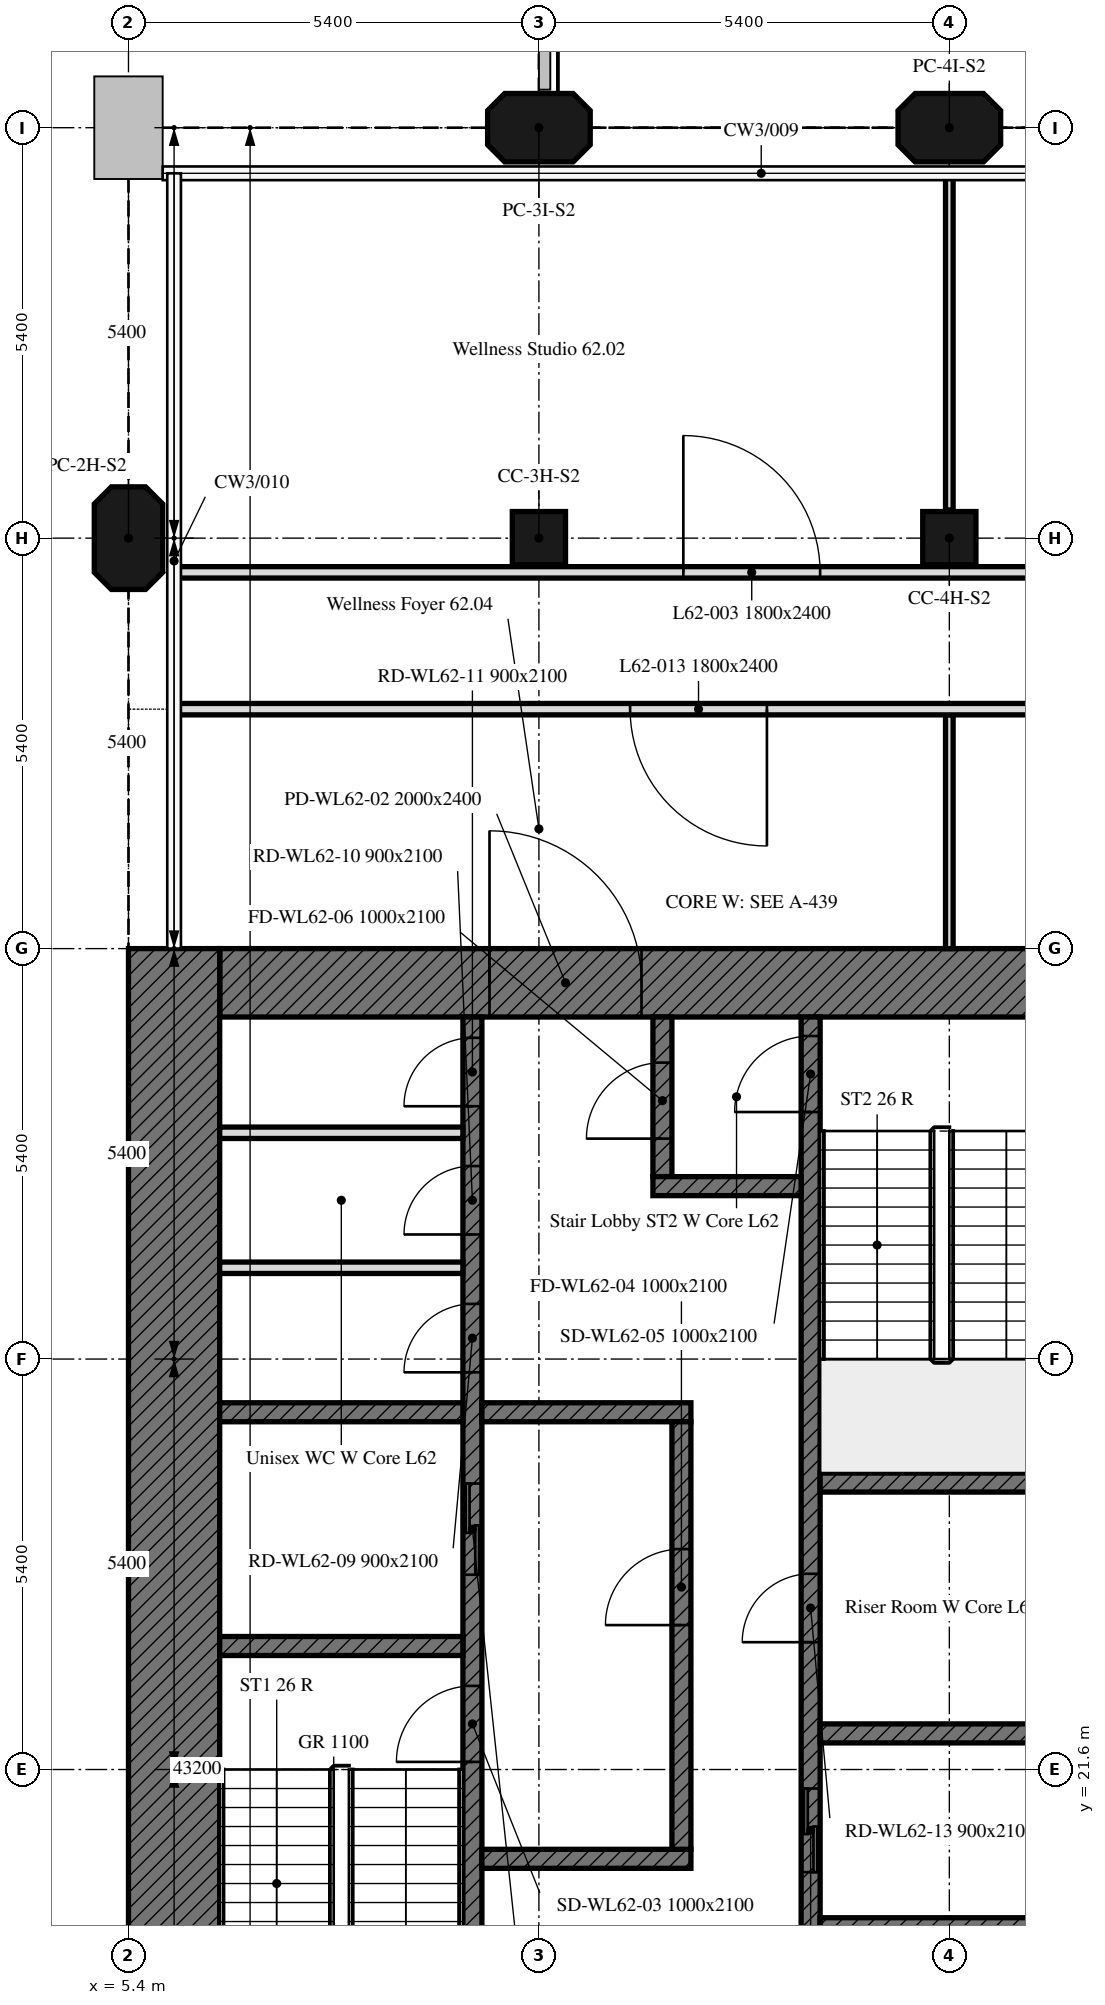
"""IFC4 building model, lengths in metres.
Left out: names, types, materials, properties, quantities, classifications, styles, units other than length and angle.
Written with IfcOpenShell. Run it as: python <this file> out.ifc"""

import sys

from ifc_helpers import new_model, si_unit, direction, frame, frame_2d, origin, origin_2d, place, context, subcontext, project, spatial, polyline, rectangle, outline, extrude, element, fill, save


model = new_model("IFC4")
c1 = context("Model", 3, precision=1e-05, world=origin(), true_north=direction((0.0, 1.0)))
c2 = subcontext(c1, "Body", "Model", "MODEL_VIEW")
j1 = project(units=[si_unit("LENGTHUNIT", "METRE"), si_unit("PLANEANGLEUNIT", "RADIAN")], contexts=[c1])
p1 = place(None, origin())
s1 = spatial("IfcSite", under=j1, at=p1, CompositionType="ELEMENT")
p2 = place(p1, origin())
s2 = spatial("IfcBuilding", under=s1, at=p2, CompositionType="ELEMENT")
p3 = place(p2, frame((0.0, 0.0, 255.7)))
s3 = spatial("IfcBuildingStorey", under=s2, at=p3, CompositionType="ELEMENT", Elevation=255.7)
p4 = place(p3, frame((5.4, 37.8, 0.0), z_axis=(0.0, 0.0, 1.0), x_axis=(0.0, 1.0, 0.0)))
e1 = element("IfcColumn", 1, at=p4, inside=s3, PredefinedType="COLUMN", context=c2, shape_type="SweptSolid", body=[
    extrude(outline(polyline([(-0.45, -0.45), (0.45, -0.45), (0.675, -0.225), (0.675, 0.225), (0.45, 0.45), (-0.45, 0.45), (-0.675, 0.225), (-0.675, -0.225), (-0.45, -0.45)])), origin(), (0.0, 0.0, 1.0), 4.5),
])
for number, where, z_axis, x_axis in (
    (2, (10.8, 37.8, 0.0), (0.0, 0.0, 1.0), (1.0, 0.0, 0.0)),
    (3, (16.2, 37.8, 0.0), (0.0, 0.0, 1.0), (1.0, 0.0, 0.0)),
):
    element("IfcColumn", number, at=place(p3, frame(where, z_axis=z_axis, x_axis=x_axis)), inside=s3, PredefinedType="COLUMN", context=c2, shape_type="SweptSolid", body=[
        extrude(rectangle(XDim=0.7, YDim=0.7, at=origin_2d()), origin(), (0.0, 0.0, 1.0), 4.5),
    ])
for number, where, z_axis, x_axis in (
    (4, (10.8, 43.2, 0.0), (0.0, 0.0, 1.0), (1.0, 0.0, 0.0)),
    (5, (16.2, 43.2, 0.0), (0.0, 0.0, 1.0), (1.0, 0.0, 0.0)),
):
    element("IfcColumn", number, at=place(p3, frame(where, z_axis=z_axis, x_axis=x_axis)), inside=s3, PredefinedType="COLUMN", context=c2, shape_type="SweptSolid", body=[
        extrude(outline(polyline([(-0.45, -0.45), (0.45, -0.45), (0.675, -0.225), (0.675, 0.225), (0.45, 0.45), (-0.45, 0.45), (-0.675, 0.225), (-0.675, -0.225), (-0.45, -0.45)])), origin(), (0.0, 0.0, 1.0), 4.5),
    ])
p5 = place(p3, frame((6.6, 31.95, 0.0), z_axis=(0.0, 0.0, 1.0), x_axis=(1.0, 0.0, 0.0)))
e6 = element("IfcWall", 6, at=p5, inside=s3, PredefinedType="SOLIDWALL", context=c2, shape_type="SweptSolid", body=[
    extrude(rectangle(XDim=11.1, YDim=0.9, at=frame_2d((5.55, 0.0))), origin(), (0.0, 0.0, 1.0), 4.5),
])
p6 = place(p5, frame((3.55, 0.0, 0.0)))
e7 = element("IfcOpeningElement", 7, at=p6, cuts=e6, PredefinedType="OPENING", context=c2, shape_type="SweptSolid", body=[
    extrude(rectangle(XDim=2.0, YDim=2.4, at=frame_2d((1.0, 1.2))), frame((0.0, 0.45, 0.0), z_axis=(0.0, -1.0, 0.0), x_axis=(1.0, 0.0, 0.0)), (0.0, 0.0, 1.0), 0.9),
])
p7 = place(p3, frame((6.0, 16.2, 0.0), z_axis=(0.0, 0.0, 1.0), x_axis=(0.0, 1.0, 0.0)))
e8 = element("IfcWall", 8, at=p7, inside=s3, PredefinedType="SOLIDWALL", context=c2, shape_type="SweptSolid", body=[
    extrude(rectangle(XDim=16.2, YDim=1.2, at=frame_2d((8.1, 0.0))), origin(), (0.0, 0.0, 1.0), 4.5),
])
p8 = place(p3, frame((9.925, 17.1, 0.0), z_axis=(0.0, 0.0, 1.0), x_axis=(0.0, 1.0, 0.0)))
e9 = element("IfcWall", 9, at=p8, inside=s3, PredefinedType="SOLIDWALL", context=c2, shape_type="SweptSolid", body=[
    extrude(rectangle(XDim=14.4, YDim=0.25, at=frame_2d((7.2, 0.0))), origin(), (0.0, 0.0, 1.0), 4.5),
])
p9 = place(p8, frame((4.6, 0.0, 0.0)))
e10 = element("IfcOpeningElement", 10, at=p9, cuts=e9, PredefinedType="OPENING", context=c2, shape_type="SweptSolid", body=[
    extrude(rectangle(XDim=1.0, YDim=2.1, at=frame_2d((0.5, 1.05))), frame((0.0, 0.125, 0.0), z_axis=(0.0, -1.0, 0.0), x_axis=(1.0, 0.0, 0.0)), (0.0, 0.0, 1.0), 0.25),
])
p10 = place(p8, frame((7.062, 0.0, 0.0)))
e11 = element("IfcOpeningElement", 11, at=p10, cuts=e9, PredefinedType="OPENING", context=c2, shape_type="SweptSolid", body=[
    extrude(rectangle(XDim=1.2, YDim=2.1, at=frame_2d((0.6, 1.05))), frame((0.0, 0.125, 0.0), z_axis=(0.0, -1.0, 0.0), x_axis=(1.0, 0.0, 0.0)), (0.0, 0.0, 1.0), 0.25),
])
p11 = place(p8, frame((9.726, 0.0, 0.0)))
e12 = element("IfcOpeningElement", 12, at=p11, cuts=e9, PredefinedType="OPENING", context=c2, shape_type="SweptSolid", body=[
    extrude(rectangle(XDim=0.9, YDim=2.1, at=frame_2d((0.45, 1.05))), frame((0.0, 0.125, 0.0), z_axis=(0.0, -1.0, 0.0), x_axis=(1.0, 0.0, 0.0)), (0.0, 0.0, 1.0), 0.25),
])
p12 = place(p8, frame((11.539, 0.0, 0.0)))
e13 = element("IfcOpeningElement", 13, at=p12, cuts=e9, PredefinedType="OPENING", context=c2, shape_type="SweptSolid", body=[
    extrude(rectangle(XDim=0.9, YDim=2.1, at=frame_2d((0.45, 1.05))), frame((0.0, 0.125, 0.0), z_axis=(0.0, -1.0, 0.0), x_axis=(1.0, 0.0, 0.0)), (0.0, 0.0, 1.0), 0.25),
])
p13 = place(p8, frame((13.226, 0.0, 0.0)))
e14 = element("IfcOpeningElement", 14, at=p13, cuts=e9, PredefinedType="OPENING", context=c2, shape_type="SweptSolid", body=[
    extrude(rectangle(XDim=0.9, YDim=2.1, at=frame_2d((0.45, 1.05))), frame((0.0, 0.125, 0.0), z_axis=(0.0, -1.0, 0.0), x_axis=(1.0, 0.0, 0.0)), (0.0, 0.0, 1.0), 0.25),
])
p14 = place(p3, frame((14.375, 17.1, 0.0), z_axis=(0.0, 0.0, 1.0), x_axis=(0.0, 1.0, 0.0)))
e15 = element("IfcWall", 15, at=p14, inside=s3, PredefinedType="SOLIDWALL", context=c2, shape_type="SweptSolid", body=[
    extrude(rectangle(XDim=14.4, YDim=0.25, at=frame_2d((7.2, 0.0))), origin(), (0.0, 0.0, 1.0), 4.5),
])
p15 = place(p14, frame((13.15, 0.0, 0.0)))
e16 = element("IfcOpeningElement", 16, at=p15, cuts=e15, PredefinedType="OPENING", context=c2, shape_type="SweptSolid", body=[
    extrude(rectangle(XDim=1.0, YDim=2.1, at=frame_2d((0.5, 1.05))), frame((0.0, 0.125, 0.0), z_axis=(0.0, -1.0, 0.0), x_axis=(1.0, 0.0, 0.0)), (0.0, 0.0, 1.0), 0.25),
])
p16 = place(p14, frame((3.15, 0.0, 0.0)))
e17 = element("IfcOpeningElement", 17, at=p16, cuts=e15, PredefinedType="OPENING", context=c2, shape_type="SweptSolid", body=[
    extrude(rectangle(XDim=1.1, YDim=2.1, at=frame_2d((0.55, 1.05))), frame((0.0, 0.125, 0.0), z_axis=(0.0, -1.0, 0.0), x_axis=(1.0, 0.0, 0.0)), (0.0, 0.0, 1.0), 0.25),
])
p17 = place(p14, frame((0.7, 0.0, 0.0)))
e18 = element("IfcOpeningElement", 18, at=p17, cuts=e15, PredefinedType="OPENING", context=c2, shape_type="SweptSolid", body=[
    extrude(rectangle(XDim=0.9, YDim=2.1, at=frame_2d((0.45, 1.05))), frame((0.0, 0.125, 0.0), z_axis=(0.0, -1.0, 0.0), x_axis=(1.0, 0.0, 0.0)), (0.0, 0.0, 1.0), 0.25),
])
p18 = place(p14, frame((6.175, 0.0, 0.0)))
e19 = element("IfcOpeningElement", 19, at=p18, cuts=e15, PredefinedType="OPENING", context=c2, shape_type="SweptSolid", body=[
    extrude(rectangle(XDim=0.9, YDim=2.1, at=frame_2d((0.45, 1.05))), frame((0.0, 0.125, 0.0), z_axis=(0.0, -1.0, 0.0), x_axis=(1.0, 0.0, 0.0)), (0.0, 0.0, 1.0), 0.25),
])
for number, where, z_axis, x_axis in (
    (20, (6.6, 23.225, 0.0), (0.0, 0.0, 1.0), (1.0, 0.0, 0.0)),
    (21, (14.5, 25.375, 0.0), (0.0, 0.0, 1.0), (1.0, 0.0, 0.0)),
    (22, (14.5, 22.075, 0.0), (0.0, 0.0, 1.0), (1.0, 0.0, 0.0)),
    (23, (6.6, 26.3, 0.0), (0.0, 0.0, 1.0), (1.0, 0.0, 0.0)),
):
    element("IfcWall", number, at=place(p3, frame(where, z_axis=z_axis, x_axis=x_axis)), inside=s3, PredefinedType="SOLIDWALL", context=c2, shape_type="SweptSolid", body=[
        extrude(rectangle(XDim=3.2, YDim=0.25, at=frame_2d((1.6, 0.0))), origin(), (0.0, 0.0, 1.0), 4.5),
    ])
for number, where, z_axis, x_axis in (
    (24, (10.05, 26.3, 0.0), (0.0, 0.0, 1.0), (1.0, 0.0, 0.0)),
    (25, (10.05, 20.425, 0.0), (0.0, 0.0, 1.0), (1.0, 0.0, 0.0)),
):
    element("IfcWall", number, at=place(p3, frame(where, z_axis=z_axis, x_axis=x_axis)), inside=s3, PredefinedType="SOLIDWALL", context=c2, shape_type="SweptSolid", body=[
        extrude(rectangle(XDim=2.75, YDim=0.25, at=frame_2d((1.375, 0.0))), origin(), (0.0, 0.0, 1.0), 4.5),
    ])
p19 = place(p3, frame((12.425, 29.4, 0.0), z_axis=(0.0, 0.0, 1.0), x_axis=(0.0, 1.0, 0.0)))
e26 = element("IfcWall", 26, at=p19, inside=s3, PredefinedType="SOLIDWALL", context=c2, shape_type="SweptSolid", body=[
    extrude(rectangle(XDim=2.1, YDim=0.25, at=frame_2d((1.05, 0.0))), origin(), (0.0, 0.0, 1.0), 4.5),
])
p20 = place(p19, frame((0.5, 0.0, 0.0)))
e27 = element("IfcOpeningElement", 27, at=p20, cuts=e26, PredefinedType="OPENING", context=c2, shape_type="SweptSolid", body=[
    extrude(rectangle(XDim=1.0, YDim=2.1, at=frame_2d((0.5, 1.05))), frame((0.0, 0.125, 0.0), z_axis=(0.0, -1.0, 0.0), x_axis=(1.0, 0.0, 0.0)), (0.0, 0.0, 1.0), 0.25),
])
p21 = place(p3, frame((12.3, 29.275, 0.0), z_axis=(0.0, 0.0, 1.0), x_axis=(1.0, 0.0, 0.0)))
e28 = element("IfcWall", 28, at=p21, inside=s3, PredefinedType="SOLIDWALL", context=c2, shape_type="SweptSolid", body=[
    extrude(rectangle(XDim=1.95, YDim=0.25, at=frame_2d((0.975, 0.0))), origin(), (0.0, 0.0, 1.0), 4.5),
])
p22 = place(p3, frame((12.675, 20.55, 0.0), z_axis=(0.0, 0.0, 1.0), x_axis=(0.0, 1.0, 0.0)))
e29 = element("IfcWall", 29, at=p22, inside=s3, PredefinedType="SOLIDWALL", context=c2, shape_type="SweptSolid", body=[
    extrude(rectangle(XDim=5.625, YDim=0.25, at=frame_2d((2.812, 0.0))), origin(), (0.0, 0.0, 1.0), 4.5),
])
p23 = place(p22, frame((2.95, 0.0, 0.0)))
e30 = element("IfcOpeningElement", 30, at=p23, cuts=e29, PredefinedType="OPENING", context=c2, shape_type="SweptSolid", body=[
    extrude(rectangle(XDim=1.0, YDim=2.1, at=frame_2d((0.5, 1.05))), frame((0.0, 0.125, 0.0), z_axis=(0.0, -1.0, 0.0), x_axis=(1.0, 0.0, 0.0)), (0.0, 0.0, 1.0), 0.25),
])
p24 = place(p3, frame((14.5, 19.525, 0.0), z_axis=(0.0, 0.0, 1.0), x_axis=(1.0, 0.0, 0.0)))
e31 = element("IfcWall", 31, at=p24, inside=s3, PredefinedType="SOLIDWALL", context=c2, shape_type="SweptSolid", body=[
    extrude(rectangle(XDim=3.2, YDim=0.25, at=frame_2d((1.6, 0.0))), origin(), (0.0, 0.0, 1.0), 4.5),
])
for number, where, z_axis, x_axis in (
    (32, (6.6, 28.201, 0.0), (0.0, 0.0, 1.0), (1.0, 0.0, 0.0)),
    (33, (6.6, 29.977, 0.0), (0.0, 0.0, 1.0), (1.0, 0.0, 0.0)),
):
    element("IfcWall", number, at=place(p3, frame(where, z_axis=z_axis, x_axis=x_axis)), inside=s3, PredefinedType="PARTITIONING", context=c2, shape_type="SweptSolid", body=[
        extrude(rectangle(XDim=3.2, YDim=0.15, at=frame_2d((1.6, 0.0))), origin(), (0.0, 0.0, 1.0), 4.5),
    ])
p25 = place(p3, frame((16.2, 42.6, 0.0), z_axis=(0.0, 0.0, 1.0), x_axis=(0.0, -1.0, 0.0)))
e34 = element("IfcWall", 34, at=p25, inside=s3, PredefinedType="PARTITIONING", context=c2, shape_type="SweptSolid", body=[
    extrude(rectangle(XDim=4.43, YDim=0.1, at=frame_2d((2.215, 0.0))), origin(), (0.0, 0.0, 1.0), 4.5),
])
p26 = place(p3, frame((6.0, 37.35, 0.0), z_axis=(0.0, 0.0, 1.0), x_axis=(1.0, 0.0, 0.0)))
e35 = element("IfcWall", 35, at=p26, inside=s3, PredefinedType="PARTITIONING", context=c2, shape_type="SweptSolid", body=[
    extrude(rectangle(XDim=31.349, YDim=0.15, at=frame_2d((15.675, 0.0))), origin(), (0.0, 0.0, 1.0), 4.5),
])
p27 = place(p26, frame((28.2, 0.0, 0.0)))
e36 = element("IfcOpeningElement", 36, at=p27, cuts=e35, PredefinedType="OPENING", context=c2, shape_type="SweptSolid", body=[
    extrude(rectangle(XDim=1.8, YDim=2.4, at=frame_2d((0.9, 1.2))), frame((0.0, 0.075, 0.0), z_axis=(0.0, -1.0, 0.0), x_axis=(1.0, 0.0, 0.0)), (0.0, 0.0, 1.0), 0.15),
])
p28 = place(p26, frame((17.5, 0.0, 0.0)))
e37 = element("IfcOpeningElement", 37, at=p28, cuts=e35, PredefinedType="OPENING", context=c2, shape_type="SweptSolid", body=[
    extrude(rectangle(XDim=1.8, YDim=2.4, at=frame_2d((0.9, 1.2))), frame((0.0, 0.075, 0.0), z_axis=(0.0, -1.0, 0.0), x_axis=(1.0, 0.0, 0.0)), (0.0, 0.0, 1.0), 0.15),
])
p29 = place(p26, frame((6.7, 0.0, 0.0)))
e38 = element("IfcOpeningElement", 38, at=p29, cuts=e35, PredefinedType="OPENING", context=c2, shape_type="SweptSolid", body=[
    extrude(rectangle(XDim=1.8, YDim=2.4, at=frame_2d((0.9, 1.2))), frame((0.0, 0.075, 0.0), z_axis=(0.0, -1.0, 0.0), x_axis=(1.0, 0.0, 0.0)), (0.0, 0.0, 1.0), 0.15),
])
p30 = place(p3, frame((16.2, 35.475, 0.0), z_axis=(0.0, 0.0, 1.0), x_axis=(0.0, -1.0, 0.0)))
e39 = element("IfcWall", 39, at=p30, inside=s3, PredefinedType="PARTITIONING", context=c2, shape_type="SweptSolid", body=[
    extrude(rectangle(XDim=3.075, YDim=0.1, at=frame_2d((1.538, 0.0))), origin(), (0.0, 0.0, 1.0), 4.5),
])
p31 = place(p3, frame((42.6, 35.55, 0.0), z_axis=(0.0, 0.0, 1.0), x_axis=(-1.0, 0.0, 0.0)))
e40 = element("IfcWall", 40, at=p31, inside=s3, PredefinedType="PARTITIONING", context=c2, shape_type="SweptSolid", body=[
    extrude(rectangle(XDim=36.6, YDim=0.15, at=frame_2d((18.3, 0.0))), origin(), (0.0, 0.0, 1.0), 4.5),
])
p32 = place(p31, frame((12.0, 0.0, 0.0)))
e41 = element("IfcOpeningElement", 41, at=p32, cuts=e40, PredefinedType="OPENING", context=c2, shape_type="SweptSolid", body=[
    extrude(rectangle(XDim=1.8, YDim=2.4, at=frame_2d((0.9, 1.2))), frame((0.0, 0.075, 0.0), z_axis=(0.0, -1.0, 0.0), x_axis=(1.0, 0.0, 0.0)), (0.0, 0.0, 1.0), 0.15),
])
p33 = place(p31, frame((17.4, 0.0, 0.0)))
e42 = element("IfcOpeningElement", 42, at=p33, cuts=e40, PredefinedType="OPENING", context=c2, shape_type="SweptSolid", body=[
    extrude(rectangle(XDim=1.8, YDim=2.4, at=frame_2d((0.9, 1.2))), frame((0.0, 0.075, 0.0), z_axis=(0.0, -1.0, 0.0), x_axis=(1.0, 0.0, 0.0)), (0.0, 0.0, 1.0), 0.15),
])
p34 = place(p31, frame((22.8, 0.0, 0.0)))
e43 = element("IfcOpeningElement", 43, at=p34, cuts=e40, PredefinedType="OPENING", context=c2, shape_type="SweptSolid", body=[
    extrude(rectangle(XDim=1.8, YDim=2.4, at=frame_2d((0.9, 1.2))), frame((0.0, 0.075, 0.0), z_axis=(0.0, -1.0, 0.0), x_axis=(1.0, 0.0, 0.0)), (0.0, 0.0, 1.0), 0.15),
])
p35 = place(p31, frame((1.8, 0.0, 0.0)))
e44 = element("IfcOpeningElement", 44, at=p35, cuts=e40, PredefinedType="OPENING", context=c2, shape_type="SweptSolid", body=[
    extrude(rectangle(XDim=1.8, YDim=2.4, at=frame_2d((0.9, 1.2))), frame((0.0, 0.075, 0.0), z_axis=(0.0, -1.0, 0.0), x_axis=(1.0, 0.0, 0.0)), (0.0, 0.0, 1.0), 0.15),
])
p36 = place(p31, frame((28.8, 0.0, 0.0)))
e45 = element("IfcOpeningElement", 45, at=p36, cuts=e40, PredefinedType="OPENING", context=c2, shape_type="SweptSolid", body=[
    extrude(rectangle(XDim=1.8, YDim=2.4, at=frame_2d((0.9, 1.2))), frame((0.0, 0.075, 0.0), z_axis=(0.0, -1.0, 0.0), x_axis=(1.0, 0.0, 0.0)), (0.0, 0.0, 1.0), 0.15),
])
p37 = place(p6, origin())
e46 = element("IfcDoor", 46, at=p37, inside=s3, OperationType="DOUBLE_DOOR_SINGLE_SWING", PredefinedType="DOOR", context=c2, shape_type="SweptSolid", body=[
    extrude(rectangle(XDim=2.0, YDim=2.4, at=frame_2d((1.0, 1.2))), frame((0.0, 0.025, 0.0), z_axis=(0.0, -1.0, 0.0), x_axis=(1.0, 0.0, 0.0)), (0.0, 0.0, 1.0), 0.05),
])
fill(e7, e46)
p38 = place(p9, origin())
e47 = element("IfcDoor", 47, at=p38, inside=s3, OperationType="SINGLE_SWING_LEFT", PredefinedType="DOOR", context=c2, shape_type="SweptSolid", body=[
    extrude(rectangle(XDim=1.0, YDim=2.1, at=frame_2d((0.5, 1.05))), frame((0.0, 0.025, 0.0), z_axis=(0.0, -1.0, 0.0), x_axis=(1.0, 0.0, 0.0)), (0.0, 0.0, 1.0), 0.05),
])
fill(e10, e47)
p39 = place(p23, origin())
e48 = element("IfcDoor", 48, at=p39, inside=s3, OperationType="SINGLE_SWING_LEFT", PredefinedType="DOOR", context=c2, shape_type="SweptSolid", body=[
    extrude(rectangle(XDim=1.0, YDim=2.1, at=frame_2d((0.5, 1.05))), frame((0.0, 0.025, 0.0), z_axis=(0.0, -1.0, 0.0), x_axis=(1.0, 0.0, 0.0)), (0.0, 0.0, 1.0), 0.05),
])
fill(e30, e48)
p40 = place(p15, origin())
e49 = element("IfcDoor", 49, at=p40, inside=s3, OperationType="SINGLE_SWING_LEFT", PredefinedType="DOOR", context=c2, shape_type="SweptSolid", body=[
    extrude(rectangle(XDim=1.0, YDim=2.1, at=frame_2d((0.5, 1.05))), frame((0.0, 0.025, 0.0), z_axis=(0.0, -1.0, 0.0), x_axis=(1.0, 0.0, 0.0)), (0.0, 0.0, 1.0), 0.05),
])
fill(e16, e49)
p41 = place(p20, origin())
e50 = element("IfcDoor", 50, at=p41, inside=s3, OperationType="SINGLE_SWING_LEFT", PredefinedType="DOOR", context=c2, shape_type="SweptSolid", body=[
    extrude(rectangle(XDim=1.0, YDim=2.1, at=frame_2d((0.5, 1.05))), frame((0.0, 0.025, 0.0), z_axis=(0.0, -1.0, 0.0), x_axis=(1.0, 0.0, 0.0)), (0.0, 0.0, 1.0), 0.05),
])
fill(e27, e50)
p42 = place(p10, origin())
e51 = element("IfcDoor", 51, at=p42, inside=s3, OperationType="DOUBLE_DOOR_SLIDING", PredefinedType="DOOR", context=c2, shape_type="SweptSolid", body=[
    extrude(rectangle(XDim=1.2, YDim=2.1, at=frame_2d((0.6, 1.05))), frame((0.0, 0.025, 0.0), z_axis=(0.0, -1.0, 0.0), x_axis=(1.0, 0.0, 0.0)), (0.0, 0.0, 1.0), 0.05),
])
fill(e11, e51)
p43 = place(p16, origin())
e52 = element("IfcDoor", 52, at=p43, inside=s3, OperationType="DOUBLE_DOOR_SLIDING", PredefinedType="DOOR", context=c2, shape_type="SweptSolid", body=[
    extrude(rectangle(XDim=1.1, YDim=2.1, at=frame_2d((0.55, 1.05))), frame((0.0, 0.025, 0.0), z_axis=(0.0, -1.0, 0.0), x_axis=(1.0, 0.0, 0.0)), (0.0, 0.0, 1.0), 0.05),
])
fill(e17, e52)
p44 = place(p11, origin())
e53 = element("IfcDoor", 53, at=p44, inside=s3, OperationType="SINGLE_SWING_LEFT", PredefinedType="DOOR", context=c2, shape_type="SweptSolid", body=[
    extrude(rectangle(XDim=0.9, YDim=2.1, at=frame_2d((0.45, 1.05))), frame((0.0, 0.025, 0.0), z_axis=(0.0, -1.0, 0.0), x_axis=(1.0, 0.0, 0.0)), (0.0, 0.0, 1.0), 0.05),
])
fill(e12, e53)
p45 = place(p12, origin())
e54 = element("IfcDoor", 54, at=p45, inside=s3, OperationType="SINGLE_SWING_LEFT", PredefinedType="DOOR", context=c2, shape_type="SweptSolid", body=[
    extrude(rectangle(XDim=0.9, YDim=2.1, at=frame_2d((0.45, 1.05))), frame((0.0, 0.025, 0.0), z_axis=(0.0, -1.0, 0.0), x_axis=(1.0, 0.0, 0.0)), (0.0, 0.0, 1.0), 0.05),
])
fill(e13, e54)
p46 = place(p13, origin())
e55 = element("IfcDoor", 55, at=p46, inside=s3, OperationType="SINGLE_SWING_LEFT", PredefinedType="DOOR", context=c2, shape_type="SweptSolid", body=[
    extrude(rectangle(XDim=0.9, YDim=2.1, at=frame_2d((0.45, 1.05))), frame((0.0, 0.025, 0.0), z_axis=(0.0, -1.0, 0.0), x_axis=(1.0, 0.0, 0.0)), (0.0, 0.0, 1.0), 0.05),
])
fill(e14, e55)
p47 = place(p18, origin())
e56 = element("IfcDoor", 56, at=p47, inside=s3, OperationType="SINGLE_SWING_LEFT", PredefinedType="DOOR", context=c2, shape_type="SweptSolid", body=[
    extrude(rectangle(XDim=0.9, YDim=2.1, at=frame_2d((0.45, 1.05))), frame((0.0, 0.025, 0.0), z_axis=(0.0, -1.0, 0.0), x_axis=(1.0, 0.0, 0.0)), (0.0, 0.0, 1.0), 0.05),
])
fill(e19, e56)
p48 = place(p29, origin())
e57 = element("IfcDoor", 57, at=p48, inside=s3, OperationType="DOUBLE_DOOR_SINGLE_SWING", PredefinedType="DOOR", context=c2, shape_type="SweptSolid", body=[
    extrude(rectangle(XDim=1.8, YDim=2.4, at=frame_2d((0.9, 1.2))), frame((0.0, 0.025, 0.0), z_axis=(0.0, -1.0, 0.0), x_axis=(1.0, 0.0, 0.0)), (0.0, 0.0, 1.0), 0.05),
])
fill(e38, e57)
p49 = place(p36, origin())
e58 = element("IfcDoor", 58, at=p49, inside=s3, OperationType="DOUBLE_DOOR_SINGLE_SWING", PredefinedType="DOOR", context=c2, shape_type="SweptSolid", body=[
    extrude(rectangle(XDim=1.8, YDim=2.4, at=frame_2d((0.9, 1.2))), frame((0.0, 0.025, 0.0), z_axis=(0.0, -1.0, 0.0), x_axis=(1.0, 0.0, 0.0)), (0.0, 0.0, 1.0), 0.05),
])
fill(e45, e58)
save(model, sys.argv[1])
